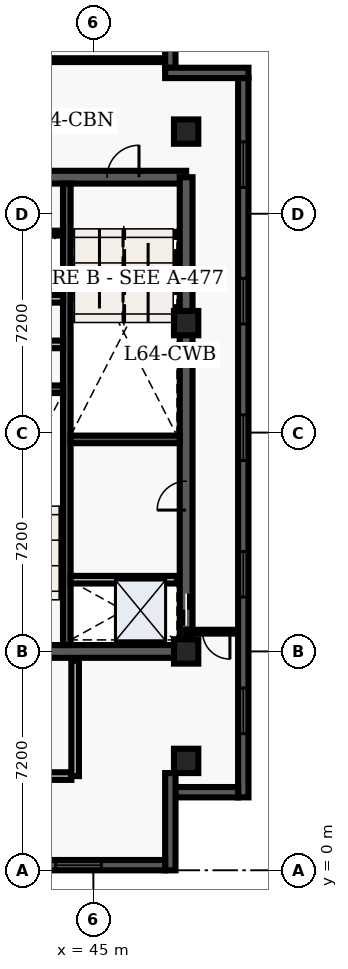
"""IFC4 building model, lengths in metres.
Left out: names, types, materials, properties, quantities, classifications, styles, units other than length and angle.
Written with IfcOpenShell. Run it as: python <this file> out.ifc"""

import sys

from ifc_helpers import new_model, entity, si_unit, converted_unit, direction, frame, origin_with_axes, origin_2d_with_axis, place, context, subcontext, project, spatial, polyline, rectangle, outline, extrude, element, fill, save


model = new_model("IFC4")
c1 = context("Model", 3, precision=1e-05, world=origin_with_axes(), true_north=direction((0.0, 1.0)))
c2 = subcontext(c1, "Body", "Model", "MODEL_VIEW")
j1 = project(units=[si_unit("LENGTHUNIT", "METRE"), converted_unit("PLANEANGLEUNIT", "DEGREE", entity("IfcPlaneAngleMeasure", 0.017), si_unit("PLANEANGLEUNIT", "RADIAN"), dimensions=[0, 0, 0, 0, 0, 0, 0])], contexts=[c1])
p1 = place(None, origin_with_axes())
s1 = spatial("IfcSite", under=j1, at=p1, CompositionType="ELEMENT")
p2 = place(p1, origin_with_axes())
s2 = spatial("IfcBuilding", under=s1, at=p2, CompositionType="ELEMENT")
p3 = place(p2, frame((0.0, 0.0, 260.7), z_axis=(0.0, 0.0, 1.0), x_axis=(1.0, 0.0, 0.0)))
s3 = spatial("IfcBuildingStorey", under=s2, at=p3, CompositionType="ELEMENT", Elevation=260.7)
p4 = place(p3, frame((40.2, 7.2, 0.0), z_axis=(0.0, 0.0, 1.0), x_axis=(1.0, 0.0, 0.0)))
e1 = element("IfcWall", 1, at=p4, inside=s3, PredefinedType="SHEAR", context=c2, shape_type="SweptSolid", body=[
    extrude(outline(polyline([(0.0, -0.21), (7.85, -0.21), (7.85, 0.21), (0.0, 0.21), (0.0, -0.21)])), origin_with_axes(), (0.0, 0.0, 1.0), 3.66),
])
p5 = place(p4, frame((2.175, 0.0, 0.0), z_axis=(0.0, 0.0, 1.0), x_axis=(1.0, 0.0, 0.0)))
e2 = element("IfcOpeningElement", 2, at=p5, cuts=e1, PredefinedType="OPENING", context=c2, shape_type="SweptSolid", body=[
    extrude(rectangle(XDim=1.05, YDim=0.44, at=origin_2d_with_axis()), origin_with_axes(), (0.0, 0.0, 1.0), 2.15),
])
p6 = place(p3, frame((40.2, 22.8, 0.0), z_axis=(0.0, 0.0, 1.0), x_axis=(1.0, 0.0, 0.0)))
e3 = element("IfcWall", 3, at=p6, inside=s3, PredefinedType="SHEAR", context=c2, shape_type="SweptSolid", body=[
    extrude(outline(polyline([(0.0, -0.21), (7.85, -0.21), (7.85, 0.21), (0.0, 0.21), (0.0, -0.21)])), origin_with_axes(), (0.0, 0.0, 1.0), 3.66),
])
p7 = place(p6, frame((5.775, 0.0, 0.0), z_axis=(0.0, 0.0, 1.0), x_axis=(1.0, 0.0, 0.0)))
e4 = element("IfcOpeningElement", 4, at=p7, cuts=e3, PredefinedType="OPENING", context=c2, shape_type="SweptSolid", body=[
    extrude(rectangle(XDim=1.05, YDim=0.44, at=origin_2d_with_axis()), origin_with_axes(), (0.0, 0.0, 1.0), 2.15),
])
p8 = place(p6, frame((2.15, 0.0, 0.0), z_axis=(0.0, 0.0, 1.0), x_axis=(1.0, 0.0, 0.0)))
e5 = element("IfcOpeningElement", 5, at=p8, cuts=e3, PredefinedType="OPENING", context=c2, shape_type="SweptSolid", body=[
    extrude(rectangle(XDim=0.9, YDim=0.44, at=origin_2d_with_axis()), origin_with_axes(), (0.0, 0.0, 1.0), 2.15),
])
p9 = place(p3, frame((48.05, 7.2, 0.0), z_axis=(0.0, 0.0, 1.0), x_axis=(0.0, 1.0, 0.0)))
e6 = element("IfcWall", 6, at=p9, inside=s3, PredefinedType="SHEAR", context=c2, shape_type="SweptSolid", body=[
    extrude(outline(polyline([(0.0, -0.21), (15.6, -0.21), (15.6, 0.21), (0.0, 0.21), (0.0, -0.21)])), origin_with_axes(), (0.0, 0.0, 1.0), 3.66),
])
p10 = place(p9, frame((1.375, 0.0, 0.0), z_axis=(0.0, 0.0, 1.0), x_axis=(1.0, 0.0, 0.0)))
e7 = element("IfcOpeningElement", 7, at=p10, cuts=e6, PredefinedType="OPENING", context=c2, shape_type="SweptSolid", body=[
    extrude(rectangle(XDim=1.05, YDim=0.44, at=origin_2d_with_axis()), origin_with_axes(), (0.0, 0.0, 1.0), 2.15),
])
p11 = place(p9, frame((5.125, 0.0, 0.0), z_axis=(0.0, 0.0, 1.0), x_axis=(1.0, 0.0, 0.0)))
e8 = element("IfcOpeningElement", 8, at=p11, cuts=e6, PredefinedType="OPENING", context=c2, shape_type="SweptSolid", body=[
    extrude(rectangle(XDim=0.95, YDim=0.44, at=origin_2d_with_axis()), origin_with_axes(), (0.0, 0.0, 1.0), 2.15),
])
p12 = place(p3, frame((44.125, 7.41, 0.0), z_axis=(0.0, 0.0, 1.0), x_axis=(0.0, 1.0, 0.0)))
e9 = element("IfcWall", 9, at=p12, inside=s3, PredefinedType="SHEAR", context=c2, shape_type="SweptSolid", body=[
    extrude(outline(polyline([(0.0, -0.125), (15.18, -0.125), (15.18, 0.125), (0.0, 0.125), (0.0, -0.125)])), origin_with_axes(), (0.0, 0.0, 1.0), 3.66),
])
for number, where, z_axis, x_axis in (
    (10, (40.41, 15.825, 0.0), (0.0, 0.0, 1.0), (1.0, 0.0, 0.0)),
    (11, (44.25, 14.175, 0.0), (0.0, 0.0, 1.0), (1.0, 0.0, 0.0)),
):
    element("IfcWall", number, at=place(p3, frame(where, z_axis=z_axis, x_axis=x_axis)), inside=s3, PredefinedType="SHEAR", context=c2, shape_type="SweptSolid", body=[
        extrude(outline(polyline([(0.0, -0.125), (3.59, -0.125), (3.59, 0.125), (0.0, 0.125), (0.0, -0.125)])), origin_with_axes(), (0.0, 0.0, 1.0), 3.66),
    ])
p13 = place(p3, frame((40.5, 17.3, 0.0), z_axis=(0.0, 0.0, 1.0), x_axis=(1.0, 0.0, 0.0)))
e12 = element("IfcWall", 12, at=p13, inside=s3, PredefinedType="SOLIDWALL", context=c2, shape_type="SweptSolid", body=[
    extrude(outline(polyline([(0.0, -0.125), (3.5, -0.125), (3.5, 0.125), (0.0, 0.125), (0.0, -0.125)])), origin_with_axes(), (0.0, 0.0, 1.0), 2.7),
])
p14 = place(p13, frame((2.4, 0.0, 0.0), z_axis=(0.0, 0.0, 1.0), x_axis=(1.0, 0.0, 0.0)))
e13 = element("IfcOpeningElement", 13, at=p14, cuts=e12, PredefinedType="OPENING", context=c2, shape_type="SweptSolid", body=[
    extrude(rectangle(XDim=0.9, YDim=0.27, at=origin_2d_with_axis()), origin_with_axes(), (0.0, 0.0, 1.0), 2.15),
])
p15 = place(p3, frame((40.5, 18.8, 0.0), z_axis=(0.0, 0.0, 1.0), x_axis=(1.0, 0.0, 0.0)))
e14 = element("IfcWall", 14, at=p15, inside=s3, PredefinedType="SOLIDWALL", context=c2, shape_type="SweptSolid", body=[
    extrude(outline(polyline([(0.0, -0.125), (3.5, -0.125), (3.5, 0.125), (0.0, 0.125), (0.0, -0.125)])), origin_with_axes(), (0.0, 0.0, 1.0), 2.7),
])
p16 = place(p3, frame((40.325, 3.1, 0.0), z_axis=(0.0, 0.0, 1.0), x_axis=(1.0, 0.0, 0.0)))
e15 = element("IfcWall", 15, at=p16, inside=s3, PredefinedType="SOLIDWALL", context=c2, shape_type="SweptSolid", body=[
    extrude(outline(polyline([(0.0, -0.125), (3.95, -0.125), (3.95, 0.125), (0.0, 0.125), (0.0, -0.125)])), origin_with_axes(), (0.0, 0.0, 1.0), 2.7),
])
p17 = place(p3, frame((44.4, 3.1, 0.0), z_axis=(0.0, 0.0, 1.0), x_axis=(0.0, 1.0, 0.0)))
e16 = element("IfcWall", 16, at=p17, inside=s3, PredefinedType="SOLIDWALL", context=c2, shape_type="SweptSolid", body=[
    extrude(outline(polyline([(0.0, -0.125), (3.8, -0.125), (3.8, 0.125), (0.0, 0.125), (0.0, -0.125)])), origin_with_axes(), (0.0, 0.0, 1.0), 2.7),
])
for number, where, z_axis, x_axis in (
    (17, (48.05, 3.6, 0.0), (0.0, 0.0, 1.0), (1.0, 0.0, 0.0)),
    (18, (48.05, 7.2, 0.0), (0.0, 0.0, 1.0), (1.0, 0.0, 0.0)),
    (19, (48.05, 18.0, 0.0), (0.0, 0.0, 1.0), (1.0, 0.0, 0.0)),
    (20, (48.05, 24.3, 0.0), (0.0, 0.0, 1.0), (1.0, 0.0, 0.0)),
):
    element("IfcColumn", number, at=place(p3, frame(where, z_axis=z_axis, x_axis=x_axis)), inside=s3, PredefinedType="COLUMN", context=c2, shape_type="SweptSolid", body=[
        extrude(rectangle(XDim=0.8, YDim=0.8, at=origin_2d_with_axis()), origin_with_axes(), (0.0, 0.0, 1.0), 3.9),
    ])
p18 = place(p3, frame((40.5, 20.96, 0.0), z_axis=(0.0, 0.0, 1.0), x_axis=(1.0, 0.0, 0.0)))
e21 = element("IfcWall", 21, at=p18, inside=s3, PredefinedType="PARTITIONING", context=c2, shape_type="SweptSolid", body=[
    extrude(outline(polyline([(0.0, -0.08), (3.5, -0.08), (3.5, 0.08), (0.0, 0.08), (0.0, -0.08)])), origin_with_axes(), (0.0, 0.0, 1.0), 2.7),
])
p19 = place(p3, frame((44.25, 9.56, 0.0), z_axis=(0.0, 0.0, 1.0), x_axis=(1.0, 0.0, 0.0)))
e22 = element("IfcWall", 22, at=p19, inside=s3, PredefinedType="SOLIDWALL", context=c2, shape_type="SweptSolid", body=[
    extrude(outline(polyline([(0.0, -0.125), (3.5, -0.125), (3.5, 0.125), (0.0, 0.125), (0.0, -0.125)])), origin_with_axes(), (0.0, 0.0, 1.0), 2.7),
])
p20 = place(p3, frame((49.765, 7.85, 0.0), z_axis=(0.0, 0.0, 1.0), x_axis=(-1.0, 0.0, 0.0)))
e23 = element("IfcWall", 23, at=p20, inside=s3, PredefinedType="PARTITIONING", context=c2, shape_type="SweptSolid", body=[
    extrude(outline(polyline([(0.0, -0.062), (1.715, -0.062), (1.715, 0.062), (0.0, 0.062), (0.0, -0.062)])), origin_with_axes(), (0.0, 0.0, 1.0), 2.7),
])
p21 = place(p20, frame((0.725, 0.0, 0.0), z_axis=(0.0, 0.0, 1.0), x_axis=(1.0, 0.0, 0.0)))
e24 = element("IfcOpeningElement", 24, at=p21, cuts=e23, PredefinedType="OPENING", context=c2, shape_type="SweptSolid", body=[
    extrude(rectangle(XDim=0.9, YDim=0.145, at=origin_2d_with_axis()), origin_with_axes(), (0.0, 0.0, 1.0), 2.15),
])
p22 = place(p3, frame((34.535, 26.65, 0.0), z_axis=(0.0, 0.0, 1.0), x_axis=(1.0, 0.0, 0.0)))
e25 = element("IfcWall", 25, at=p22, inside=s3, PredefinedType="PARTITIONING", context=c2, shape_type="SweptSolid", body=[
    extrude(outline(polyline([(0.0, -0.062), (12.995, -0.062), (12.995, 0.062), (0.0, 0.062), (0.0, -0.062)])), origin_with_axes(), (0.0, 0.0, 1.0), 2.7),
])
p23 = place(p22, frame((8.465, 0.0, 0.0), z_axis=(0.0, 0.0, 1.0), x_axis=(1.0, 0.0, 0.0)))
e26 = element("IfcOpeningElement", 26, at=p23, cuts=e25, PredefinedType="OPENING", context=c2, shape_type="SweptSolid", body=[
    extrude(rectangle(XDim=1.0, YDim=0.145, at=origin_2d_with_axis()), origin_with_axes(), (0.0, 0.0, 1.0), 2.15),
])
p24 = place(p3, frame((47.53, 28.46, 0.0), z_axis=(0.0, 0.0, 1.0), x_axis=(0.0, -1.0, 0.0)))
e27 = element("IfcWall", 27, at=p24, inside=s3, PredefinedType="SOLIDWALL", context=c2, shape_type="SweptSolid", body=[
    extrude(outline(polyline([(0.0, -0.17), (2.06, -0.17), (2.06, 0.17), (0.0, 0.17), (0.0, -0.17)])), origin_with_axes(), (0.0, 0.0, 1.0), 3.66),
])
p25 = place(p3, frame((47.36, 26.23, 0.0), z_axis=(0.0, 0.0, 1.0), x_axis=(1.0, 0.0, 0.0)))
e28 = element("IfcWall", 28, at=p25, inside=s3, PredefinedType="SOLIDWALL", context=c2, shape_type="SweptSolid", body=[
    extrude(outline(polyline([(0.0, -0.17), (2.74, -0.17), (2.74, 0.17), (0.0, 0.17), (0.0, -0.17)])), origin_with_axes(), (0.0, 0.0, 1.0), 3.66),
])
p26 = place(p3, frame((49.93, 26.06, 0.0), z_axis=(0.0, 0.0, 1.0), x_axis=(0.0, -1.0, 0.0)))
e29 = element("IfcWall", 29, at=p26, inside=s3, PredefinedType="SOLIDWALL", context=c2, shape_type="SweptSolid", body=[
    extrude(outline(polyline([(0.0, -0.17), (23.66, -0.17), (23.66, 0.17), (0.0, 0.17), (0.0, -0.17)])), origin_with_axes(), (0.0, 0.0, 1.0), 3.66),
])
p27 = place(p26, frame((2.846, 0.0, 0.45), z_axis=(0.0, 0.0, 1.0), x_axis=(1.0, 0.0, 0.0)))
e30 = element("IfcOpeningElement", 30, at=p27, cuts=e29, PredefinedType="OPENING", context=c2, shape_type="SweptSolid", body=[
    extrude(rectangle(XDim=1.5, YDim=0.36, at=origin_2d_with_axis()), origin_with_axes(), (0.0, 0.0, 1.0), 2.1),
])
p28 = place(p26, frame((7.338, 0.0, 0.45), z_axis=(0.0, 0.0, 1.0), x_axis=(1.0, 0.0, 0.0)))
e31 = element("IfcOpeningElement", 31, at=p28, cuts=e29, PredefinedType="OPENING", context=c2, shape_type="SweptSolid", body=[
    extrude(rectangle(XDim=1.5, YDim=0.36, at=origin_2d_with_axis()), origin_with_axes(), (0.0, 0.0, 1.0), 2.1),
])
p29 = place(p26, frame((11.83, 0.0, 0.45), z_axis=(0.0, 0.0, 1.0), x_axis=(1.0, 0.0, 0.0)))
e32 = element("IfcOpeningElement", 32, at=p29, cuts=e29, PredefinedType="OPENING", context=c2, shape_type="SweptSolid", body=[
    extrude(rectangle(XDim=1.5, YDim=0.36, at=origin_2d_with_axis()), origin_with_axes(), (0.0, 0.0, 1.0), 2.1),
])
p30 = place(p26, frame((16.322, 0.0, 0.45), z_axis=(0.0, 0.0, 1.0), x_axis=(1.0, 0.0, 0.0)))
e33 = element("IfcOpeningElement", 33, at=p30, cuts=e29, PredefinedType="OPENING", context=c2, shape_type="SweptSolid", body=[
    extrude(rectangle(XDim=1.5, YDim=0.36, at=origin_2d_with_axis()), origin_with_axes(), (0.0, 0.0, 1.0), 2.1),
])
p31 = place(p26, frame((20.814, 0.0, 0.45), z_axis=(0.0, 0.0, 1.0), x_axis=(1.0, 0.0, 0.0)))
e34 = element("IfcOpeningElement", 34, at=p31, cuts=e29, PredefinedType="OPENING", context=c2, shape_type="SweptSolid", body=[
    extrude(rectangle(XDim=1.5, YDim=0.36, at=origin_2d_with_axis()), origin_with_axes(), (0.0, 0.0, 1.0), 2.1),
])
p32 = place(p3, frame((49.76, 2.57, 0.0), z_axis=(0.0, 0.0, 1.0), x_axis=(-1.0, 0.0, 0.0)))
e35 = element("IfcWall", 35, at=p32, inside=s3, PredefinedType="SOLIDWALL", context=c2, shape_type="SweptSolid", body=[
    extrude(outline(polyline([(0.0, -0.17), (2.06, -0.17), (2.06, 0.17), (0.0, 0.17), (0.0, -0.17)])), origin_with_axes(), (0.0, 0.0, 1.0), 3.66),
])
p33 = place(p3, frame((47.53, 3.2, 0.0), z_axis=(0.0, 0.0, 1.0), x_axis=(0.0, -1.0, 0.0)))
e36 = element("IfcWall", 36, at=p33, inside=s3, PredefinedType="SOLIDWALL", context=c2, shape_type="SweptSolid", body=[
    extrude(outline(polyline([(0.0, -0.17), (3.2, -0.17), (3.2, 0.17), (0.0, 0.17), (0.0, -0.17)])), origin_with_axes(), (0.0, 0.0, 1.0), 3.66),
])
p34 = place(p3, frame((47.36, 0.17, 0.0), z_axis=(0.0, 0.0, 1.0), x_axis=(-1.0, 0.0, 0.0)))
e37 = element("IfcWall", 37, at=p34, inside=s3, PredefinedType="SOLIDWALL", context=c2, shape_type="SweptSolid", body=[
    extrude(outline(polyline([(0.0, -0.17), (37.16, -0.17), (37.16, 0.17), (0.0, 0.17), (0.0, -0.17)])), origin_with_axes(), (0.0, 0.0, 1.0), 3.66),
])
p35 = place(p34, frame((2.847, 0.0, 0.45), z_axis=(0.0, 0.0, 1.0), x_axis=(1.0, 0.0, 0.0)))
e38 = element("IfcOpeningElement", 38, at=p35, cuts=e37, PredefinedType="OPENING", context=c2, shape_type="SweptSolid", body=[
    extrude(rectangle(XDim=1.5, YDim=0.36, at=origin_2d_with_axis()), origin_with_axes(), (0.0, 0.0, 1.0), 2.1),
])
p36 = place(p34, frame((7.342, 0.0, 0.45), z_axis=(0.0, 0.0, 1.0), x_axis=(1.0, 0.0, 0.0)))
e39 = element("IfcOpeningElement", 39, at=p36, cuts=e37, PredefinedType="OPENING", context=c2, shape_type="SweptSolid", body=[
    extrude(rectangle(XDim=1.5, YDim=0.36, at=origin_2d_with_axis()), origin_with_axes(), (0.0, 0.0, 1.0), 2.1),
])
p37 = place(p34, frame((11.837, 0.0, 0.45), z_axis=(0.0, 0.0, 1.0), x_axis=(1.0, 0.0, 0.0)))
e40 = element("IfcOpeningElement", 40, at=p37, cuts=e37, PredefinedType="OPENING", context=c2, shape_type="SweptSolid", body=[
    extrude(rectangle(XDim=1.5, YDim=0.36, at=origin_2d_with_axis()), origin_with_axes(), (0.0, 0.0, 1.0), 2.1),
])
p38 = place(p34, frame((16.332, 0.0, 0.45), z_axis=(0.0, 0.0, 1.0), x_axis=(1.0, 0.0, 0.0)))
e41 = element("IfcOpeningElement", 41, at=p38, cuts=e37, PredefinedType="OPENING", context=c2, shape_type="SweptSolid", body=[
    extrude(rectangle(XDim=1.5, YDim=0.36, at=origin_2d_with_axis()), origin_with_axes(), (0.0, 0.0, 1.0), 2.1),
])
p39 = place(p34, frame((21.277, 0.0, 0.45), z_axis=(0.0, 0.0, 1.0), x_axis=(1.0, 0.0, 0.0)))
e42 = element("IfcOpeningElement", 42, at=p39, cuts=e37, PredefinedType="OPENING", context=c2, shape_type="SweptSolid", body=[
    extrude(rectangle(XDim=1.5, YDim=0.36, at=origin_2d_with_axis()), origin_with_axes(), (0.0, 0.0, 1.0), 2.1),
])
p40 = place(p34, frame((25.322, 0.0, 0.45), z_axis=(0.0, 0.0, 1.0), x_axis=(1.0, 0.0, 0.0)))
e43 = element("IfcOpeningElement", 43, at=p40, cuts=e37, PredefinedType="OPENING", context=c2, shape_type="SweptSolid", body=[
    extrude(rectangle(XDim=1.5, YDim=0.36, at=origin_2d_with_axis()), origin_with_axes(), (0.0, 0.0, 1.0), 2.1),
])
p41 = place(p34, frame((29.817, 0.0, 0.45), z_axis=(0.0, 0.0, 1.0), x_axis=(1.0, 0.0, 0.0)))
e44 = element("IfcOpeningElement", 44, at=p41, cuts=e37, PredefinedType="OPENING", context=c2, shape_type="SweptSolid", body=[
    extrude(rectangle(XDim=1.5, YDim=0.36, at=origin_2d_with_axis()), origin_with_axes(), (0.0, 0.0, 1.0), 2.1),
])
p42 = place(p34, frame((34.312, 0.0, 0.45), z_axis=(0.0, 0.0, 1.0), x_axis=(1.0, 0.0, 0.0)))
e45 = element("IfcOpeningElement", 45, at=p42, cuts=e37, PredefinedType="OPENING", context=c2, shape_type="SweptSolid", body=[
    extrude(rectangle(XDim=1.5, YDim=0.36, at=origin_2d_with_axis()), origin_with_axes(), (0.0, 0.0, 1.0), 2.1),
])
p43 = place(p9, frame((1.375, 0.0, 0.0), z_axis=(0.0, 0.0, 1.0), x_axis=(1.0, 0.0, 0.0)))
e46 = element("IfcDoor", 46, at=p43, inside=s3, OperationType="SLIDING_TO_LEFT", PredefinedType="DOOR", context=c2, shape_type="SweptSolid", body=[
    extrude(rectangle(XDim=1.05, YDim=0.09, at=origin_2d_with_axis()), origin_with_axes(), (0.0, 0.0, 1.0), 2.15),
])
fill(e7, e46)
p44 = place(p6, frame((5.775, 0.0, 0.0), z_axis=(0.0, 0.0, 1.0), x_axis=(1.0, 0.0, 0.0)))
e47 = element("IfcDoor", 47, at=p44, inside=s3, OperationType="SINGLE_SWING_RIGHT", PredefinedType="DOOR", context=c2, shape_type="SweptSolid", body=[
    extrude(rectangle(XDim=1.05, YDim=0.09, at=origin_2d_with_axis()), origin_with_axes(), (0.0, 0.0, 1.0), 2.15),
])
fill(e4, e47)
p45 = place(p9, frame((5.125, 0.0, 0.0), z_axis=(0.0, 0.0, 1.0), x_axis=(1.0, 0.0, 0.0)))
e48 = element("IfcDoor", 48, at=p45, inside=s3, OperationType="SINGLE_SWING_LEFT", PredefinedType="DOOR", context=c2, shape_type="SweptSolid", body=[
    extrude(rectangle(XDim=0.95, YDim=0.09, at=origin_2d_with_axis()), origin_with_axes(), (0.0, 0.0, 1.0), 2.15),
])
fill(e8, e48)
p46 = place(p20, frame((0.725, 0.0, 0.0), z_axis=(0.0, 0.0, 1.0), x_axis=(1.0, 0.0, 0.0)))
e49 = element("IfcDoor", 49, at=p46, inside=s3, OperationType="SINGLE_SWING_LEFT", PredefinedType="DOOR", context=c2, shape_type="SweptSolid", body=[
    extrude(rectangle(XDim=0.9, YDim=0.075, at=origin_2d_with_axis()), origin_with_axes(), (0.0, 0.0, 1.0), 2.15),
])
fill(e24, e49)
p47 = place(p26, frame((2.846, 0.0, 0.45), z_axis=(0.0, 0.0, 1.0), x_axis=(1.0, 0.0, 0.0)))
e50 = element("IfcWindow", 50, at=p47, inside=s3, PredefinedType="WINDOW", context=c2, shape_type="SweptSolid", body=[
    extrude(rectangle(XDim=1.5, YDim=0.09, at=origin_2d_with_axis()), origin_with_axes(), (0.0, 0.0, 1.0), 2.1),
])
fill(e30, e50)
p48 = place(p26, frame((7.338, 0.0, 0.45), z_axis=(0.0, 0.0, 1.0), x_axis=(1.0, 0.0, 0.0)))
e51 = element("IfcWindow", 51, at=p48, inside=s3, PredefinedType="WINDOW", context=c2, shape_type="SweptSolid", body=[
    extrude(rectangle(XDim=1.5, YDim=0.09, at=origin_2d_with_axis()), origin_with_axes(), (0.0, 0.0, 1.0), 2.1),
])
fill(e31, e51)
p49 = place(p26, frame((11.83, 0.0, 0.45), z_axis=(0.0, 0.0, 1.0), x_axis=(1.0, 0.0, 0.0)))
e52 = element("IfcWindow", 52, at=p49, inside=s3, PredefinedType="WINDOW", context=c2, shape_type="SweptSolid", body=[
    extrude(rectangle(XDim=1.5, YDim=0.09, at=origin_2d_with_axis()), origin_with_axes(), (0.0, 0.0, 1.0), 2.1),
])
fill(e32, e52)
p50 = place(p26, frame((16.322, 0.0, 0.45), z_axis=(0.0, 0.0, 1.0), x_axis=(1.0, 0.0, 0.0)))
e53 = element("IfcWindow", 53, at=p50, inside=s3, PredefinedType="WINDOW", context=c2, shape_type="SweptSolid", body=[
    extrude(rectangle(XDim=1.5, YDim=0.09, at=origin_2d_with_axis()), origin_with_axes(), (0.0, 0.0, 1.0), 2.1),
])
fill(e33, e53)
p51 = place(p26, frame((20.814, 0.0, 0.45), z_axis=(0.0, 0.0, 1.0), x_axis=(1.0, 0.0, 0.0)))
e54 = element("IfcWindow", 54, at=p51, inside=s3, PredefinedType="WINDOW", context=c2, shape_type="SweptSolid", body=[
    extrude(rectangle(XDim=1.5, YDim=0.09, at=origin_2d_with_axis()), origin_with_axes(), (0.0, 0.0, 1.0), 2.1),
])
fill(e34, e54)
p52 = place(p34, frame((2.847, 0.0, 0.45), z_axis=(0.0, 0.0, 1.0), x_axis=(1.0, 0.0, 0.0)))
e55 = element("IfcWindow", 55, at=p52, inside=s3, PredefinedType="WINDOW", context=c2, shape_type="SweptSolid", body=[
    extrude(rectangle(XDim=1.5, YDim=0.09, at=origin_2d_with_axis()), origin_with_axes(), (0.0, 0.0, 1.0), 2.1),
])
fill(e38, e55)
save(model, sys.argv[1])
